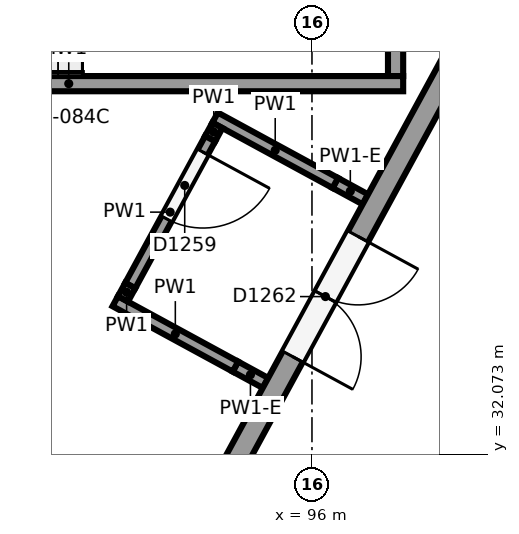
"""IFC4 building model, lengths in metres.
Left out: names, types, materials, properties, quantities, classifications, styles, units other than length and angle.
Written with IfcOpenShell. Run it as: python <this file> out.ifc"""

import sys

from ifc_helpers import new_model, si_unit, direction, frame, frame_2d, origin, place, context, subcontext, project, spatial, rectangle, extrude, element, fill, save


model = new_model("IFC4")
c1 = context("Model", 3, precision=1e-05, world=origin(), true_north=direction((0.0, 1.0)))
c2 = subcontext(c1, "Body", "Model", "MODEL_VIEW")
j1 = project(units=[si_unit("LENGTHUNIT", "METRE"), si_unit("PLANEANGLEUNIT", "RADIAN")], contexts=[c1])
p1 = place(None, origin())
s1 = spatial("IfcSite", under=j1, at=p1, CompositionType="ELEMENT")
p2 = place(p1, origin())
s2 = spatial("IfcBuilding", under=s1, at=p2, CompositionType="ELEMENT")
p3 = place(p2, frame((0.0, 0.0, 12.0)))
s3 = spatial("IfcBuildingStorey", under=s2, at=p3, CompositionType="ELEMENT", Elevation=12.0)
p4 = place(p3, frame((101.161, 43.311, 0.0), z_axis=(0.0, 0.0, 1.0), x_axis=(-0.477867771117, -0.878431780691, 0.0)))
e1 = element("IfcWall", 1, at=p4, inside=s3, PredefinedType="SOLIDWALL", context=c2, shape_type="SweptSolid", body=[
    extrude(rectangle(XDim=13.28, YDim=0.3, at=frame_2d((6.64, 0.0))), origin(), (0.0, 0.0, 1.0), 4.35),
])
p5 = place(p4, frame((9.53, 0.0, 0.0)))
e2 = element("IfcOpeningElement", 2, at=p5, cuts=e1, PredefinedType="OPENING", context=c2, shape_type="SweptSolid", body=[
    extrude(rectangle(XDim=1.8, YDim=2.4, at=frame_2d((0.9, 1.2))), frame((0.0, 0.16, 0.0), z_axis=(0.0, -1.0, 0.0), x_axis=(1.0, 0.0, 0.0)), (0.0, 0.0, 1.0), 0.32),
])
p6 = place(p3, frame((97.2, 36.95, 0.0), z_axis=(0.0, 0.0, 1.0), x_axis=(-1.0, 0.0, 0.0)))
e3 = element("IfcWall", 3, at=p6, inside=s3, PredefinedType="SHEAR", context=c2, shape_type="SweptSolid", body=[
    extrude(rectangle(XDim=8.8, YDim=0.2, at=frame_2d((4.4, 0.0))), origin(), (0.0, 0.0, 1.0), 5.65),
])
p7 = place(p3, frame((97.1, 37.05, 0.0), z_axis=(0.0, 0.0, 1.0), x_axis=(0.0, 1.0, 0.0)))
e4 = element("IfcWall", 4, at=p7, inside=s3, PredefinedType="SHEAR", context=c2, shape_type="SweptSolid", body=[
    extrude(rectangle(XDim=6.6, YDim=0.2, at=frame_2d((3.3, 0.0))), origin(), (0.0, 0.0, 1.0), 5.65),
])
p8 = place(p3, frame((96.702, 35.428, 0.0), z_axis=(0.0, 0.0, 1.0), x_axis=(-0.878372019733, 0.477977609256, 0.0)))
e5 = element("IfcWall", 5, at=p8, inside=s3, PredefinedType="PARTITIONING", context=c2, shape_type="SweptSolid", body=[
    extrude(rectangle(XDim=0.45, YDim=0.15, at=frame_2d((0.225, 0.0))), origin(), (0.0, 0.0, 1.0), 4.35),
])
p9 = place(p3, frame((96.307, 35.643, 0.0), z_axis=(0.0, 0.0, 1.0), x_axis=(-0.878428962466, 0.477872951632, 0.0)))
e6 = element("IfcWall", 6, at=p9, inside=s3, PredefinedType="PARTITIONING", context=c2, shape_type="SweptSolid", body=[
    extrude(rectangle(XDim=1.8, YDim=0.15, at=frame_2d((0.9, 0.0))), origin(), (0.0, 0.0, 1.0), 5.65),
])
p10 = place(p3, frame((95.388, 33.013, 0.0), z_axis=(0.0, 0.0, 1.0), x_axis=(-0.878372019733, 0.477977609256, 0.0)))
e7 = element("IfcWall", 7, at=p10, inside=s3, PredefinedType="PARTITIONING", context=c2, shape_type="SweptSolid", body=[
    extrude(rectangle(XDim=0.45, YDim=0.15, at=frame_2d((0.225, 0.0))), origin(), (0.0, 0.0, 1.0), 4.35),
])
p11 = place(p3, frame((94.993, 33.228, 0.0), z_axis=(0.0, 0.0, 1.0), x_axis=(-0.878459932885, 0.477816017223, 0.0)))
e8 = element("IfcWall", 8, at=p11, inside=s3, PredefinedType="PARTITIONING", context=c2, shape_type="SweptSolid", body=[
    extrude(rectangle(XDim=1.8, YDim=0.15, at=frame_2d((0.9, 0.0))), origin(), (0.0, 0.0, 1.0), 5.65),
])
p12 = place(p3, frame((94.756, 36.402, 0.0), z_axis=(0.0, 0.0, 1.0), x_axis=(-0.478168266369, -0.878268244352, 0.0)))
e9 = element("IfcWall", 9, at=p12, inside=s3, PredefinedType="PARTITIONING", context=c2, shape_type="SweptSolid", body=[
    extrude(rectangle(XDim=0.2, YDim=0.15, at=frame_2d((0.1, 0.0))), origin(), (0.0, 0.0, 1.0), 5.65),
])
p13 = place(p3, frame((94.66, 36.226, 0.0), z_axis=(0.0, 0.0, 1.0), x_axis=(-0.477887643273, -0.878420969927, 0.0)))
e10 = element("IfcWall", 10, at=p13, inside=s3, PredefinedType="PARTITIONING", context=c2, shape_type="SweptSolid", body=[
    extrude(rectangle(XDim=2.2, YDim=0.15, at=frame_2d((1.1, 0.0))), origin(), (0.0, 0.0, 1.0), 5.65),
])
p14 = place(p13, frame((0.2, 0.0, 0.0)))
e11 = element("IfcOpeningElement", 11, at=p14, cuts=e10, PredefinedType="OPENING", context=c2, shape_type="SweptSolid", body=[
    extrude(rectangle(XDim=1.0, YDim=2.1, at=frame_2d((0.5, 1.05))), frame((0.0, 0.085, 0.0), z_axis=(0.0, -1.0, 0.0), x_axis=(1.0, 0.0, 0.0)), (0.0, 0.0, 1.0), 0.17),
])
p15 = place(p3, frame((93.609, 34.294, 0.0), z_axis=(0.0, 0.0, 1.0), x_axis=(-0.477226530971, -0.878780312785, 0.0)))
e12 = element("IfcWall", 12, at=p15, inside=s3, PredefinedType="PARTITIONING", context=c2, shape_type="SweptSolid", body=[
    extrude(rectangle(XDim=0.2, YDim=0.15, at=frame_2d((0.1, 0.0))), origin(), (0.0, 0.0, 1.0), 5.65),
])
p16 = place(p5, origin())
e13 = element("IfcDoor", 13, at=p16, inside=s3, OperationType="DOUBLE_DOOR_SINGLE_SWING", PredefinedType="DOOR", context=c2, shape_type="SweptSolid", body=[
    extrude(rectangle(XDim=1.8, YDim=2.4, at=frame_2d((0.9, 1.2))), frame((0.0, 0.025, 0.0), z_axis=(0.0, -1.0, 0.0), x_axis=(1.0, 0.0, 0.0)), (0.0, 0.0, 1.0), 0.05),
])
fill(e2, e13)
p17 = place(p14, origin())
e14 = element("IfcDoor", 14, at=p17, inside=s3, OperationType="SINGLE_SWING_LEFT", PredefinedType="DOOR", context=c2, shape_type="SweptSolid", body=[
    extrude(rectangle(XDim=1.0, YDim=2.1, at=frame_2d((0.5, 1.05))), frame((0.0, 0.025, 0.0), z_axis=(0.0, -1.0, 0.0), x_axis=(1.0, 0.0, 0.0)), (0.0, 0.0, 1.0), 0.05),
])
fill(e11, e14)
save(model, sys.argv[1])
